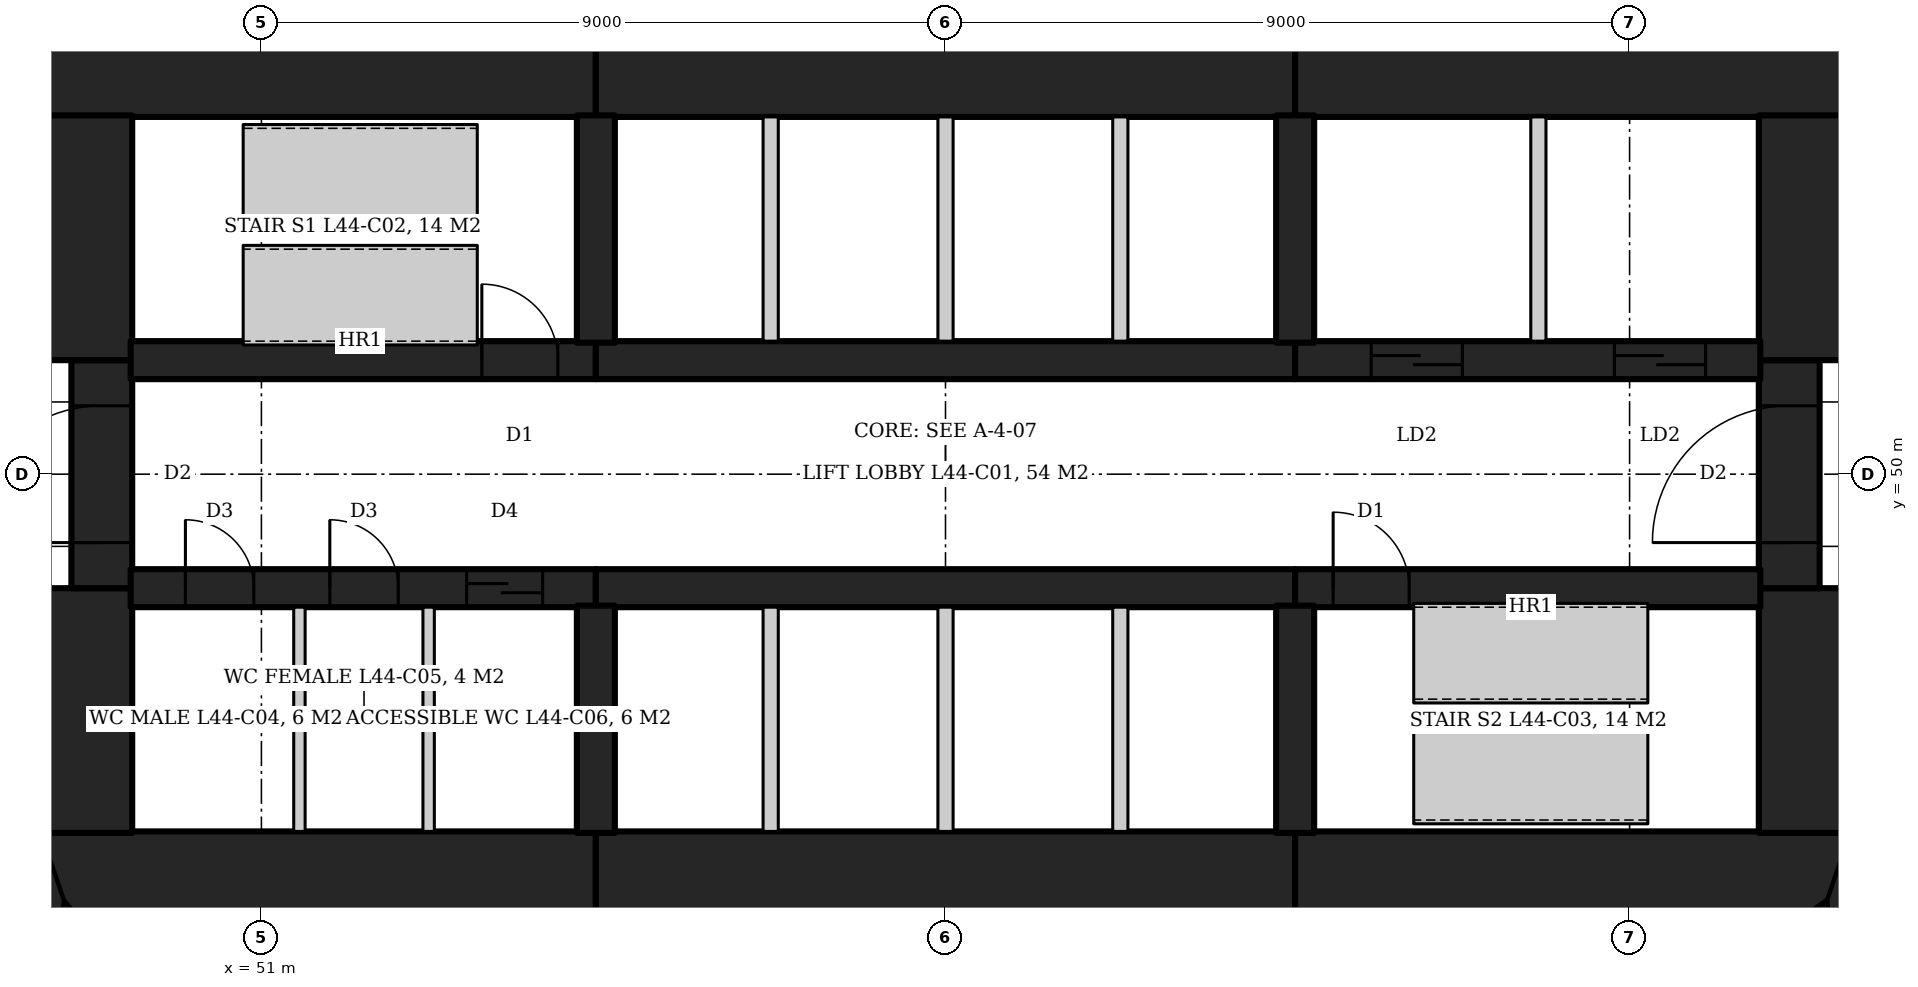
"""IFC4 building model, lengths in metres.
Left out: names, types, materials, properties, quantities, classifications, styles, units other than length and angle.
Written with IfcOpenShell. Run it as: python <this file> out.ifc"""

import sys

from ifc_helpers import new_model, si_unit, direction, frame, frame_2d, origin, place, context, subcontext, project, spatial, rectangle, extrude, element, fill, save


model = new_model("IFC4")
c1 = context("Model", 3, precision=1e-05, world=origin(), true_north=direction((0.0, 1.0)))
c2 = subcontext(c1, "Body", "Model", "MODEL_VIEW")
j1 = project(units=[si_unit("LENGTHUNIT", "METRE"), si_unit("PLANEANGLEUNIT", "RADIAN")], contexts=[c1])
p1 = place(None, origin())
s1 = spatial("IfcSite", under=j1, at=p1, CompositionType="ELEMENT")
p2 = place(p1, origin())
s2 = spatial("IfcBuilding", under=s1, at=p2, CompositionType="ELEMENT")
p3 = place(p2, frame((0.0, 0.0, 194.0)))
s3 = spatial("IfcBuildingStorey", under=s2, at=p3, CompositionType="ELEMENT", Elevation=194.0)
p4 = place(p3, frame((47.5, 55.6, 0.0), z_axis=(0.0, 0.0, 1.0), x_axis=(1.0, 0.0, 0.0)))
e1 = element("IfcWall", 1, at=p4, inside=s3, PredefinedType="SHEAR", context=c2, shape_type="SweptSolid", body=[
    extrude(rectangle(XDim=7.9, YDim=1.8, at=frame_2d((3.95, 0.0))), origin(), (0.0, 0.0, 1.0), 4.2),
])
p5 = place(p3, frame((55.4, 55.6, 0.0), z_axis=(0.0, 0.0, 1.0), x_axis=(1.0, 0.0, 0.0)))
e2 = element("IfcWall", 2, at=p5, inside=s3, PredefinedType="SHEAR", context=c2, shape_type="SweptSolid", body=[
    extrude(rectangle(XDim=9.2, YDim=1.8, at=frame_2d((4.6, 0.0))), origin(), (0.0, 0.0, 1.0), 4.2),
])
for number, where, z_axis, x_axis in (
    (3, (64.6, 55.6, 0.0), (0.0, 0.0, 1.0), (1.0, 0.0, 0.0)),
    (4, (47.5, 44.4, 0.0), (0.0, 0.0, 1.0), (1.0, 0.0, 0.0)),
):
    element("IfcWall", number, at=place(p3, frame(where, z_axis=z_axis, x_axis=x_axis)), inside=s3, PredefinedType="SHEAR", context=c2, shape_type="SweptSolid", body=[
        extrude(rectangle(XDim=7.9, YDim=1.8, at=frame_2d((3.95, 0.0))), origin(), (0.0, 0.0, 1.0), 4.2),
    ])
p6 = place(p3, frame((55.4, 44.4, 0.0), z_axis=(0.0, 0.0, 1.0), x_axis=(1.0, 0.0, 0.0)))
e5 = element("IfcWall", 5, at=p6, inside=s3, PredefinedType="SHEAR", context=c2, shape_type="SweptSolid", body=[
    extrude(rectangle(XDim=9.2, YDim=1.8, at=frame_2d((4.6, 0.0))), origin(), (0.0, 0.0, 1.0), 4.2),
])
p7 = place(p3, frame((64.6, 44.4, 0.0), z_axis=(0.0, 0.0, 1.0), x_axis=(1.0, 0.0, 0.0)))
e6 = element("IfcWall", 6, at=p7, inside=s3, PredefinedType="SHEAR", context=c2, shape_type="SweptSolid", body=[
    extrude(rectangle(XDim=7.9, YDim=1.8, at=frame_2d((3.95, 0.0))), origin(), (0.0, 0.0, 1.0), 4.2),
])
p8 = place(p3, frame((71.6, 45.28, 0.0), z_axis=(0.0, 0.0, 1.0), x_axis=(0.0, 1.0, 0.0)))
e7 = element("IfcWall", 7, at=p8, inside=s3, PredefinedType="SHEAR", context=c2, shape_type="SweptSolid", body=[
    extrude(rectangle(XDim=3.22, YDim=1.8, at=frame_2d((1.61, 0.0))), origin(), (0.0, 0.0, 1.0), 4.2),
])
p9 = place(p3, frame((71.1, 48.5, 0.0), z_axis=(0.0, 0.0, 1.0), x_axis=(0.0, 1.0, 0.0)))
e8 = element("IfcWall", 8, at=p9, inside=s3, PredefinedType="SHEAR", context=c2, shape_type="SweptSolid", body=[
    extrude(rectangle(XDim=3.0, YDim=0.8, at=frame_2d((1.5, 0.0))), origin(), (0.0, 0.0, 1.0), 4.2),
])
p10 = place(p9, frame((0.6, 0.0, 0.0)))
e9 = element("IfcOpeningElement", 9, at=p10, cuts=e8, PredefinedType="OPENING", context=c2, shape_type="SweptSolid", body=[
    extrude(rectangle(XDim=1.8, YDim=2.1, at=frame_2d((0.9, 1.05))), frame((0.0, 0.41, 0.0), z_axis=(0.0, -1.0, 0.0), x_axis=(1.0, 0.0, 0.0)), (0.0, 0.0, 1.0), 0.82),
])
for number, where, z_axis, x_axis in (
    (10, (71.6, 51.5, 0.0), (0.0, 0.0, 1.0), (0.0, 1.0, 0.0)),
    (11, (48.4, 45.28, 0.0), (0.0, 0.0, 1.0), (0.0, 1.0, 0.0)),
):
    element("IfcWall", number, at=place(p3, frame(where, z_axis=z_axis, x_axis=x_axis)), inside=s3, PredefinedType="SHEAR", context=c2, shape_type="SweptSolid", body=[
        extrude(rectangle(XDim=3.22, YDim=1.8, at=frame_2d((1.61, 0.0))), origin(), (0.0, 0.0, 1.0), 4.2),
    ])
p11 = place(p3, frame((48.9, 48.5, 0.0), z_axis=(0.0, 0.0, 1.0), x_axis=(0.0, 1.0, 0.0)))
e12 = element("IfcWall", 12, at=p11, inside=s3, PredefinedType="SHEAR", context=c2, shape_type="SweptSolid", body=[
    extrude(rectangle(XDim=3.0, YDim=0.8, at=frame_2d((1.5, 0.0))), origin(), (0.0, 0.0, 1.0), 4.2),
])
p12 = place(p11, frame((0.6, 0.0, 0.0)))
e13 = element("IfcOpeningElement", 13, at=p12, cuts=e12, PredefinedType="OPENING", context=c2, shape_type="SweptSolid", body=[
    extrude(rectangle(XDim=1.8, YDim=2.1, at=frame_2d((0.9, 1.05))), frame((0.0, 0.41, 0.0), z_axis=(0.0, -1.0, 0.0), x_axis=(1.0, 0.0, 0.0)), (0.0, 0.0, 1.0), 0.82),
])
p13 = place(p3, frame((48.4, 51.5, 0.0), z_axis=(0.0, 0.0, 1.0), x_axis=(0.0, 1.0, 0.0)))
e14 = element("IfcWall", 14, at=p13, inside=s3, PredefinedType="SHEAR", context=c2, shape_type="SweptSolid", body=[
    extrude(rectangle(XDim=3.22, YDim=1.8, at=frame_2d((1.61, 0.0))), origin(), (0.0, 0.0, 1.0), 4.2),
])
p14 = place(p3, frame((49.28, 51.5, 0.0), z_axis=(0.0, 0.0, 1.0), x_axis=(1.0, 0.0, 0.0)))
e15 = element("IfcWall", 15, at=p14, inside=s3, PredefinedType="SHEAR", context=c2, shape_type="SweptSolid", body=[
    extrude(rectangle(XDim=6.12, YDim=0.5, at=frame_2d((3.06, 0.0))), origin(), (0.0, 0.0, 1.0), 4.2),
])
p15 = place(p14, frame((4.62, 0.0, 0.0)))
e16 = element("IfcOpeningElement", 16, at=p15, cuts=e15, PredefinedType="OPENING", context=c2, shape_type="SweptSolid", body=[
    extrude(rectangle(XDim=1.0, YDim=2.1, at=frame_2d((0.5, 1.05))), frame((0.0, 0.26, 0.0), z_axis=(0.0, -1.0, 0.0), x_axis=(1.0, 0.0, 0.0)), (0.0, 0.0, 1.0), 0.52),
])
p16 = place(p3, frame((55.4, 51.5, 0.0), z_axis=(0.0, 0.0, 1.0), x_axis=(1.0, 0.0, 0.0)))
e17 = element("IfcWall", 17, at=p16, inside=s3, PredefinedType="SHEAR", context=c2, shape_type="SweptSolid", body=[
    extrude(rectangle(XDim=9.2, YDim=0.5, at=frame_2d((4.6, 0.0))), origin(), (0.0, 0.0, 1.0), 4.2),
])
p17 = place(p3, frame((64.6, 51.5, 0.0), z_axis=(0.0, 0.0, 1.0), x_axis=(1.0, 0.0, 0.0)))
e18 = element("IfcWall", 18, at=p17, inside=s3, PredefinedType="SHEAR", context=c2, shape_type="SweptSolid", body=[
    extrude(rectangle(XDim=6.12, YDim=0.5, at=frame_2d((3.06, 0.0))), origin(), (0.0, 0.0, 1.0), 4.2),
])
p18 = place(p17, frame((1.0, 0.0, 0.0)))
e19 = element("IfcOpeningElement", 19, at=p18, cuts=e18, PredefinedType="OPENING", context=c2, shape_type="SweptSolid", body=[
    extrude(rectangle(XDim=1.2, YDim=2.1, at=frame_2d((0.6, 1.05))), frame((0.0, 0.26, 0.0), z_axis=(0.0, -1.0, 0.0), x_axis=(1.0, 0.0, 0.0)), (0.0, 0.0, 1.0), 0.52),
])
p19 = place(p17, frame((4.2, 0.0, 0.0)))
e20 = element("IfcOpeningElement", 20, at=p19, cuts=e18, PredefinedType="OPENING", context=c2, shape_type="SweptSolid", body=[
    extrude(rectangle(XDim=1.2, YDim=2.1, at=frame_2d((0.6, 1.05))), frame((0.0, 0.26, 0.0), z_axis=(0.0, -1.0, 0.0), x_axis=(1.0, 0.0, 0.0)), (0.0, 0.0, 1.0), 0.52),
])
p20 = place(p3, frame((49.28, 48.5, 0.0), z_axis=(0.0, 0.0, 1.0), x_axis=(1.0, 0.0, 0.0)))
e21 = element("IfcWall", 21, at=p20, inside=s3, PredefinedType="SHEAR", context=c2, shape_type="SweptSolid", body=[
    extrude(rectangle(XDim=6.12, YDim=0.5, at=frame_2d((3.06, 0.0))), origin(), (0.0, 0.0, 1.0), 4.2),
])
p21 = place(p20, frame((0.72, 0.0, 0.0)))
e22 = element("IfcOpeningElement", 22, at=p21, cuts=e21, PredefinedType="OPENING", context=c2, shape_type="SweptSolid", body=[
    extrude(rectangle(XDim=0.9, YDim=2.1, at=frame_2d((0.45, 1.05))), frame((0.0, 0.26, 0.0), z_axis=(0.0, -1.0, 0.0), x_axis=(1.0, 0.0, 0.0)), (0.0, 0.0, 1.0), 0.52),
])
p22 = place(p20, frame((2.62, 0.0, 0.0)))
e23 = element("IfcOpeningElement", 23, at=p22, cuts=e21, PredefinedType="OPENING", context=c2, shape_type="SweptSolid", body=[
    extrude(rectangle(XDim=0.9, YDim=2.1, at=frame_2d((0.45, 1.05))), frame((0.0, 0.26, 0.0), z_axis=(0.0, -1.0, 0.0), x_axis=(1.0, 0.0, 0.0)), (0.0, 0.0, 1.0), 0.52),
])
p23 = place(p20, frame((4.42, 0.0, 0.0)))
e24 = element("IfcOpeningElement", 24, at=p23, cuts=e21, PredefinedType="OPENING", context=c2, shape_type="SweptSolid", body=[
    extrude(rectangle(XDim=1.0, YDim=2.1, at=frame_2d((0.5, 1.05))), frame((0.0, 0.26, 0.0), z_axis=(0.0, -1.0, 0.0), x_axis=(1.0, 0.0, 0.0)), (0.0, 0.0, 1.0), 0.52),
])
p24 = place(p3, frame((55.4, 48.5, 0.0), z_axis=(0.0, 0.0, 1.0), x_axis=(1.0, 0.0, 0.0)))
e25 = element("IfcWall", 25, at=p24, inside=s3, PredefinedType="SHEAR", context=c2, shape_type="SweptSolid", body=[
    extrude(rectangle(XDim=9.2, YDim=0.5, at=frame_2d((4.6, 0.0))), origin(), (0.0, 0.0, 1.0), 4.2),
])
p25 = place(p3, frame((64.6, 48.5, 0.0), z_axis=(0.0, 0.0, 1.0), x_axis=(1.0, 0.0, 0.0)))
e26 = element("IfcWall", 26, at=p25, inside=s3, PredefinedType="SHEAR", context=c2, shape_type="SweptSolid", body=[
    extrude(rectangle(XDim=6.12, YDim=0.5, at=frame_2d((3.06, 0.0))), origin(), (0.0, 0.0, 1.0), 4.2),
])
p26 = place(p25, frame((0.5, 0.0, 0.0)))
e27 = element("IfcOpeningElement", 27, at=p26, cuts=e26, PredefinedType="OPENING", context=c2, shape_type="SweptSolid", body=[
    extrude(rectangle(XDim=1.0, YDim=2.1, at=frame_2d((0.5, 1.05))), frame((0.0, 0.26, 0.0), z_axis=(0.0, -1.0, 0.0), x_axis=(1.0, 0.0, 0.0)), (0.0, 0.0, 1.0), 0.52),
])
for number, where, z_axis, x_axis in (
    (28, (55.4, 51.73, 0.0), (0.0, 0.0, 1.0), (0.0, 1.0, 0.0)),
    (29, (64.6, 51.73, 0.0), (0.0, 0.0, 1.0), (0.0, 1.0, 0.0)),
    (30, (55.4, 48.27, 0.0), (0.0, 0.0, 1.0), (0.0, -1.0, 0.0)),
    (31, (64.6, 48.27, 0.0), (0.0, 0.0, 1.0), (0.0, -1.0, 0.0)),
):
    element("IfcWall", number, at=place(p3, frame(where, z_axis=z_axis, x_axis=x_axis)), inside=s3, PredefinedType="SHEAR", context=c2, shape_type="SweptSolid", body=[
        extrude(rectangle(XDim=2.99, YDim=0.5, at=frame_2d((1.495, 0.0))), origin(), (0.0, 0.0, 1.0), 4.2),
    ])
for number, where, z_axis, x_axis in (
    (32, (57.7, 51.75, 0.0), (0.0, 0.0, 1.0), (0.0, 1.0, 0.0)),
    (33, (60.0, 51.75, 0.0), (0.0, 0.0, 1.0), (0.0, 1.0, 0.0)),
    (34, (62.3, 51.75, 0.0), (0.0, 0.0, 1.0), (0.0, 1.0, 0.0)),
    (35, (57.7, 45.3, 0.0), (0.0, 0.0, 1.0), (0.0, 1.0, 0.0)),
    (36, (60.0, 45.3, 0.0), (0.0, 0.0, 1.0), (0.0, 1.0, 0.0)),
    (37, (62.3, 45.3, 0.0), (0.0, 0.0, 1.0), (0.0, 1.0, 0.0)),
    (38, (67.8, 51.75, 0.0), (0.0, 0.0, 1.0), (0.0, 1.0, 0.0)),
):
    element("IfcWall", number, at=place(p3, frame(where, z_axis=z_axis, x_axis=x_axis)), inside=s3, PredefinedType="PARTITIONING", context=c2, shape_type="SweptSolid", body=[
        extrude(rectangle(XDim=2.95, YDim=0.2, at=frame_2d((1.475, 0.0))), origin(), (0.0, 0.0, 1.0), 4.2),
    ])
for number, where, z_axis, x_axis in (
    (39, (51.5, 45.3, 0.0), (0.0, 0.0, 1.0), (0.0, 1.0, 0.0)),
    (40, (53.2, 45.3, 0.0), (0.0, 0.0, 1.0), (0.0, 1.0, 0.0)),
):
    element("IfcWall", number, at=place(p3, frame(where, z_axis=z_axis, x_axis=x_axis)), inside=s3, PredefinedType="PARTITIONING", context=c2, shape_type="SweptSolid", body=[
        extrude(rectangle(XDim=2.95, YDim=0.15, at=frame_2d((1.475, 0.0))), origin(), (0.0, 0.0, 1.0), 4.04),
    ])
p27 = place(p15, origin())
e41 = element("IfcDoor", 41, at=p27, inside=s3, OperationType="SINGLE_SWING_LEFT", PredefinedType="DOOR", context=c2, shape_type="SweptSolid", body=[
    extrude(rectangle(XDim=1.0, YDim=2.1, at=frame_2d((0.5, 1.05))), frame((0.0, 0.025, 0.0), z_axis=(0.0, -1.0, 0.0), x_axis=(1.0, 0.0, 0.0)), (0.0, 0.0, 1.0), 0.05),
])
fill(e16, e41)
p28 = place(p26, origin())
e42 = element("IfcDoor", 42, at=p28, inside=s3, OperationType="SINGLE_SWING_LEFT", PredefinedType="DOOR", context=c2, shape_type="SweptSolid", body=[
    extrude(rectangle(XDim=1.0, YDim=2.1, at=frame_2d((0.5, 1.05))), frame((0.0, 0.025, 0.0), z_axis=(0.0, -1.0, 0.0), x_axis=(1.0, 0.0, 0.0)), (0.0, 0.0, 1.0), 0.05),
])
fill(e27, e42)
p29 = place(p18, origin())
e43 = element("IfcDoor", 43, at=p29, inside=s3, OperationType="SLIDING_TO_LEFT", PredefinedType="DOOR", context=c2, shape_type="SweptSolid", body=[
    extrude(rectangle(XDim=1.2, YDim=2.1, at=frame_2d((0.6, 1.05))), frame((0.0, 0.025, 0.0), z_axis=(0.0, -1.0, 0.0), x_axis=(1.0, 0.0, 0.0)), (0.0, 0.0, 1.0), 0.05),
])
fill(e19, e43)
p30 = place(p19, origin())
e44 = element("IfcDoor", 44, at=p30, inside=s3, OperationType="SLIDING_TO_LEFT", PredefinedType="DOOR", context=c2, shape_type="SweptSolid", body=[
    extrude(rectangle(XDim=1.2, YDim=2.1, at=frame_2d((0.6, 1.05))), frame((0.0, 0.025, 0.0), z_axis=(0.0, -1.0, 0.0), x_axis=(1.0, 0.0, 0.0)), (0.0, 0.0, 1.0), 0.05),
])
fill(e20, e44)
p31 = place(p21, origin())
e45 = element("IfcDoor", 45, at=p31, inside=s3, OperationType="SINGLE_SWING_RIGHT", PredefinedType="DOOR", context=c2, shape_type="SweptSolid", body=[
    extrude(rectangle(XDim=0.9, YDim=2.1, at=frame_2d((0.45, 1.05))), frame((0.0, 0.025, 0.0), z_axis=(0.0, -1.0, 0.0), x_axis=(1.0, 0.0, 0.0)), (0.0, 0.0, 1.0), 0.05),
])
fill(e22, e45)
p32 = place(p22, origin())
e46 = element("IfcDoor", 46, at=p32, inside=s3, OperationType="SINGLE_SWING_RIGHT", PredefinedType="DOOR", context=c2, shape_type="SweptSolid", body=[
    extrude(rectangle(XDim=0.9, YDim=2.1, at=frame_2d((0.45, 1.05))), frame((0.0, 0.025, 0.0), z_axis=(0.0, -1.0, 0.0), x_axis=(1.0, 0.0, 0.0)), (0.0, 0.0, 1.0), 0.05),
])
fill(e23, e46)
p33 = place(p23, origin())
e47 = element("IfcDoor", 47, at=p33, inside=s3, OperationType="SLIDING_TO_LEFT", PredefinedType="DOOR", context=c2, shape_type="SweptSolid", body=[
    extrude(rectangle(XDim=1.0, YDim=2.1, at=frame_2d((0.5, 1.05))), frame((0.0, 0.025, 0.0), z_axis=(0.0, -1.0, 0.0), x_axis=(1.0, 0.0, 0.0)), (0.0, 0.0, 1.0), 0.05),
])
fill(e24, e47)
p34 = place(p10, origin())
e48 = element("IfcDoor", 48, at=p34, inside=s3, OperationType="DOUBLE_DOOR_DOUBLE_SWING", PredefinedType="DOOR", context=c2, shape_type="SweptSolid", body=[
    extrude(rectangle(XDim=1.8, YDim=2.1, at=frame_2d((0.9, 1.05))), frame((0.0, 0.025, 0.0), z_axis=(0.0, -1.0, 0.0), x_axis=(1.0, 0.0, 0.0)), (0.0, 0.0, 1.0), 0.05),
])
fill(e9, e48)
p35 = place(p12, origin())
e49 = element("IfcDoor", 49, at=p35, inside=s3, OperationType="DOUBLE_DOOR_DOUBLE_SWING", PredefinedType="DOOR", context=c2, shape_type="SweptSolid", body=[
    extrude(rectangle(XDim=1.8, YDim=2.1, at=frame_2d((0.9, 1.05))), frame((0.0, 0.025, 0.0), z_axis=(0.0, -1.0, 0.0), x_axis=(1.0, 0.0, 0.0)), (0.0, 0.0, 1.0), 0.05),
])
fill(e13, e49)
save(model, sys.argv[1])
